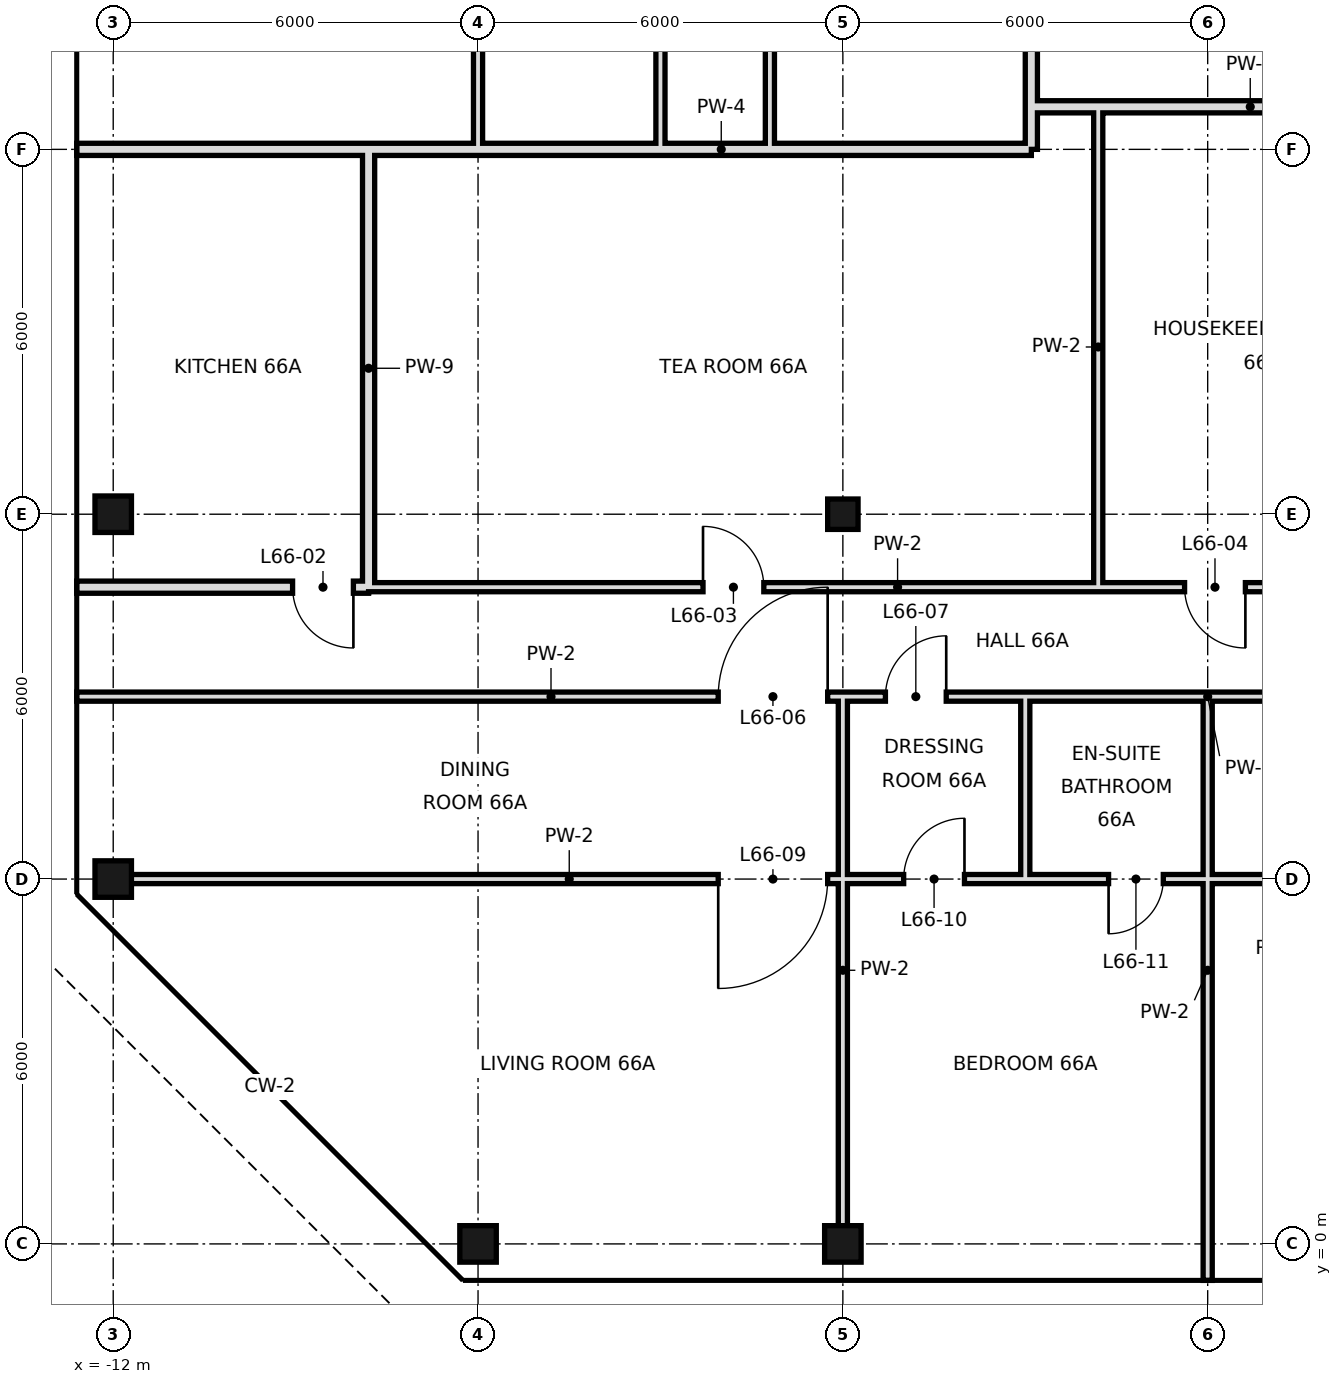
"""IFC4 building model, lengths in metres.
Left out: names, types, materials, properties, quantities, classifications, styles, units other than length and angle.
Written with IfcOpenShell. Run it as: python <this file> out.ifc"""

import sys

from ifc_helpers import new_model, si_unit, direction, frame, frame_2d, origin, origin_2d, place, context, subcontext, project, spatial, rectangle, hollow_rectangle, extrude, element, fill, save


model = new_model("IFC4")
c1 = context("Model", 3, precision=1e-05, world=origin(), true_north=direction((0.0, 1.0)))
c2 = subcontext(c1, "Body", "Model", "MODEL_VIEW")
j1 = project(units=[si_unit("LENGTHUNIT", "METRE"), si_unit("PLANEANGLEUNIT", "RADIAN")], contexts=[c1])
p1 = place(None, origin())
s1 = spatial("IfcSite", under=j1, at=p1, CompositionType="ELEMENT")
p2 = place(p1, origin())
s2 = spatial("IfcBuilding", under=s1, at=p2, CompositionType="ELEMENT")
p3 = place(p2, frame((0.0, 0.0, 277.4)))
s3 = spatial("IfcBuildingStorey", under=s2, at=p3, CompositionType="ELEMENT", Elevation=277.4)
for number, where, z_axis, x_axis in (
    (1, (-12.0, 6.0, 0.0), (0.0, 0.0, 1.0), (1.0, 0.0, 0.0)),
    (2, (-12.0, 12.0, 0.0), (0.0, 0.0, 1.0), (1.0, 0.0, 0.0)),
    (3, (-6.0, 0.0, 0.0), (0.0, 0.0, 1.0), (1.0, 0.0, 0.0)),
    (4, (0.0, 0.0, 0.0), (0.0, 0.0, 1.0), (1.0, 0.0, 0.0)),
):
    element("IfcColumn", number, at=place(p3, frame(where, z_axis=z_axis, x_axis=x_axis)), inside=s3, PredefinedType="COLUMN", context=c2, shape_type="SweptSolid", body=[
        extrude(hollow_rectangle(XDim=0.6, YDim=0.6, WallThickness=0.028, at=origin_2d()), origin(), (0.0, 0.0, 1.0), 4.4),
    ])
p4 = place(p3, frame((0.0, 12.0, 0.0), z_axis=(0.0, 0.0, 1.0), x_axis=(1.0, 0.0, 0.0)))
e5 = element("IfcColumn", 5, at=p4, inside=s3, PredefinedType="COLUMN", context=c2, shape_type="SweptSolid", body=[
    extrude(hollow_rectangle(XDim=0.5, YDim=0.5, WallThickness=0.025, at=origin_2d()), origin(), (0.0, 0.0, 1.0), 4.4),
])
p5 = place(p3, frame((-1.2, 18.0, 0.0), z_axis=(0.0, 0.0, 1.0), x_axis=(0.0, 1.0, 0.0)))
e6 = element("IfcWall", 6, at=p5, inside=s3, PredefinedType="PARTITIONING", context=c2, shape_type="SweptSolid", body=[
    extrude(rectangle(XDim=10.8, YDim=0.15, at=frame_2d((5.4, 0.0))), origin(), (0.0, 0.0, 1.0), 4.1),
])
p6 = place(p5, frame((6.76, 0.0, 0.0)))
e7 = element("IfcOpeningElement", 7, at=p6, cuts=e6, PredefinedType="OPENING", context=c2, shape_type="SweptSolid", body=[
    extrude(rectangle(XDim=1.0, YDim=2.4, at=frame_2d((0.5, 1.2))), frame((0.0, 0.085, 0.0), z_axis=(0.0, -1.0, 0.0), x_axis=(1.0, 0.0, 0.0)), (0.0, 0.0, 1.0), 0.17),
])
p7 = place(p3, frame((-3.0, 18.0, 0.0), z_axis=(0.0, 0.0, 1.0), x_axis=(0.0, 1.0, 0.0)))
e8 = element("IfcWall", 8, at=p7, inside=s3, PredefinedType="PARTITIONING", context=c2, shape_type="SweptSolid", body=[
    extrude(rectangle(XDim=15.0, YDim=0.15, at=frame_2d((7.5, 0.0))), origin(), (0.0, 0.0, 1.0), 4.1),
])
p8 = place(p7, frame((7.6, 0.0, 0.0)))
e9 = element("IfcOpeningElement", 9, at=p8, cuts=e8, PredefinedType="OPENING", context=c2, shape_type="SweptSolid", body=[
    extrude(rectangle(XDim=1.0, YDim=2.4, at=frame_2d((0.5, 1.2))), frame((0.0, 0.085, 0.0), z_axis=(0.0, -1.0, 0.0), x_axis=(1.0, 0.0, 0.0)), (0.0, 0.0, 1.0), 0.17),
])
p9 = place(p7, frame((12.7, 0.0, 0.0)))
e10 = element("IfcOpeningElement", 10, at=p9, cuts=e8, PredefinedType="OPENING", context=c2, shape_type="SweptSolid", body=[
    extrude(rectangle(XDim=1.0, YDim=2.4, at=frame_2d((0.5, 1.2))), frame((0.0, 0.085, 0.0), z_axis=(0.0, -1.0, 0.0), x_axis=(1.0, 0.0, 0.0)), (0.0, 0.0, 1.0), 0.17),
])
p10 = place(p3, frame((-6.0, 18.0, 0.0), z_axis=(0.0, 0.0, 1.0), x_axis=(0.0, 1.0, 0.0)))
e11 = element("IfcWall", 11, at=p10, inside=s3, PredefinedType="PARTITIONING", context=c2, shape_type="SweptSolid", body=[
    extrude(rectangle(XDim=15.0, YDim=0.15, at=frame_2d((7.5, 0.0))), origin(), (0.0, 0.0, 1.0), 4.1),
])
p11 = place(p10, frame((3.4, 0.0, 0.0)))
e12 = element("IfcOpeningElement", 12, at=p11, cuts=e11, PredefinedType="OPENING", context=c2, shape_type="SweptSolid", body=[
    extrude(rectangle(XDim=1.0, YDim=2.4, at=frame_2d((0.5, 1.2))), frame((0.0, 0.085, 0.0), z_axis=(0.0, -1.0, 0.0), x_axis=(1.0, 0.0, 0.0)), (0.0, 0.0, 1.0), 0.17),
])
p12 = place(p10, frame((13.0, 0.0, 0.0)))
e13 = element("IfcOpeningElement", 13, at=p12, cuts=e11, PredefinedType="OPENING", context=c2, shape_type="SweptSolid", body=[
    extrude(rectangle(XDim=1.0, YDim=2.4, at=frame_2d((0.5, 1.2))), frame((0.0, 0.085, 0.0), z_axis=(0.0, -1.0, 0.0), x_axis=(1.0, 0.0, 0.0)), (0.0, 0.0, 1.0), 0.17),
])
p13 = place(p3, frame((-7.8, 10.8, 0.0), z_axis=(0.0, 0.0, 1.0), x_axis=(0.0, 1.0, 0.0)))
e14 = element("IfcWall", 14, at=p13, inside=s3, PredefinedType="SOLIDWALL", context=c2, shape_type="SweptSolid", body=[
    extrude(rectangle(XDim=7.2, YDim=0.2, at=frame_2d((3.6, 0.0))), origin(), (0.0, 0.0, 1.0), 3.4),
])
p14 = place(p3, frame((0.0, 0.0, 0.0), z_axis=(0.0, 0.0, 1.0), x_axis=(0.0, 1.0, 0.0)))
e15 = element("IfcWall", 15, at=p14, inside=s3, PredefinedType="PARTITIONING", context=c2, shape_type="SweptSolid", body=[
    extrude(rectangle(XDim=9.0, YDim=0.15, at=frame_2d((4.5, 0.0))), origin(), (0.0, 0.0, 1.0), 3.4),
])
p15 = place(p3, frame((3.0, 6.0, 0.0), z_axis=(0.0, 0.0, 1.0), x_axis=(0.0, 1.0, 0.0)))
e16 = element("IfcWall", 16, at=p15, inside=s3, PredefinedType="PARTITIONING", context=c2, shape_type="SweptSolid", body=[
    extrude(rectangle(XDim=3.0, YDim=0.15, at=frame_2d((1.5, 0.0))), origin(), (0.0, 0.0, 1.0), 4.1),
])
p16 = place(p3, frame((3.1, 18.7, 0.0), z_axis=(0.0, 0.0, 1.0), x_axis=(0.0, 1.0, 0.0)))
e17 = element("IfcWall", 17, at=p16, inside=s3, PredefinedType="SOLIDWALL", context=c2, shape_type="SweptSolid", body=[
    extrude(rectangle(XDim=10.1, YDim=0.2, at=frame_2d((5.05, 0.0))), origin(), (0.0, 0.0, 1.0), 4.1),
])
p17 = place(p3, frame((3.1, 18.0, 0.0), z_axis=(0.0, 0.0, 1.0), x_axis=(0.0, 1.0, 0.0)))
e18 = element("IfcWall", 18, at=p17, inside=s3, PredefinedType="SOLIDWALL", context=c2, shape_type="SweptSolid", body=[
    extrude(rectangle(XDim=0.7, YDim=0.2, at=frame_2d((0.35, 0.0))), origin(), (0.0, 0.0, 1.0), 3.65),
])
p18 = place(p3, frame((4.2, 10.8, 0.0), z_axis=(0.0, 0.0, 1.0), x_axis=(0.0, 1.0, 0.0)))
e19 = element("IfcWall", 19, at=p18, inside=s3, PredefinedType="PARTITIONING", context=c2, shape_type="SweptSolid", body=[
    extrude(rectangle(XDim=7.9, YDim=0.15, at=frame_2d((3.95, 0.0))), origin(), (0.0, 0.0, 1.0), 4.1),
])
p19 = place(p3, frame((6.0, -0.6, 0.0), z_axis=(0.0, 0.0, 1.0), x_axis=(0.0, 1.0, 0.0)))
e20 = element("IfcWall", 20, at=p19, inside=s3, PredefinedType="PARTITIONING", context=c2, shape_type="SweptSolid", body=[
    extrude(rectangle(XDim=6.6, YDim=0.15, at=frame_2d((3.3, 0.0))), origin(), (0.0, 0.0, 1.0), 3.4),
])
p20 = place(p3, frame((6.0, 6.0, 0.0), z_axis=(0.0, 0.0, 1.0), x_axis=(0.0, 1.0, 0.0)))
e21 = element("IfcWall", 21, at=p20, inside=s3, PredefinedType="PARTITIONING", context=c2, shape_type="SweptSolid", body=[
    extrude(rectangle(XDim=3.0, YDim=0.15, at=frame_2d((1.5, 0.0))), origin(), (0.0, 0.0, 1.0), 3.4),
])
p21 = place(p3, frame((-12.6, 10.8, 0.0), z_axis=(0.0, 0.0, 1.0), x_axis=(1.0, 0.0, 0.0)))
e22 = element("IfcWall", 22, at=p21, inside=s3, PredefinedType="SOLIDWALL", context=c2, shape_type="SweptSolid", body=[
    extrude(rectangle(XDim=4.8, YDim=0.2, at=frame_2d((2.4, 0.0))), origin(), (0.0, 0.0, 1.0), 3.65),
])
p22 = place(p21, frame((3.55, 0.0, 0.0)))
e23 = element("IfcOpeningElement", 23, at=p22, cuts=e22, PredefinedType="OPENING", context=c2, shape_type="SweptSolid", body=[
    extrude(rectangle(XDim=1.0, YDim=2.4, at=frame_2d((0.5, 1.2))), frame((0.0, 0.11, 0.0), z_axis=(0.0, -1.0, 0.0), x_axis=(1.0, 0.0, 0.0)), (0.0, 0.0, 1.0), 0.22),
])
p23 = place(p3, frame((-7.8, 10.8, 0.0), z_axis=(0.0, 0.0, 1.0), x_axis=(1.0, 0.0, 0.0)))
e24 = element("IfcWall", 24, at=p23, inside=s3, PredefinedType="PARTITIONING", context=c2, shape_type="SweptSolid", body=[
    extrude(rectangle(XDim=17.4, YDim=0.15, at=frame_2d((8.7, 0.0))), origin(), (0.0, 0.0, 1.0), 4.1),
])
p24 = place(p23, frame((5.5, 0.0, 0.0)))
e25 = element("IfcOpeningElement", 25, at=p24, cuts=e24, PredefinedType="OPENING", context=c2, shape_type="SweptSolid", body=[
    extrude(rectangle(XDim=1.0, YDim=2.4, at=frame_2d((0.5, 1.2))), frame((0.0, 0.085, 0.0), z_axis=(0.0, -1.0, 0.0), x_axis=(1.0, 0.0, 0.0)), (0.0, 0.0, 1.0), 0.17),
])
p25 = place(p23, frame((13.42, 0.0, 0.0)))
e26 = element("IfcOpeningElement", 26, at=p25, cuts=e24, PredefinedType="OPENING", context=c2, shape_type="SweptSolid", body=[
    extrude(rectangle(XDim=1.0, YDim=2.4, at=frame_2d((0.5, 1.2))), frame((0.0, 0.085, 0.0), z_axis=(0.0, -1.0, 0.0), x_axis=(1.0, 0.0, 0.0)), (0.0, 0.0, 1.0), 0.17),
])
p26 = place(p3, frame((-12.6, 18.0, 0.0), z_axis=(0.0, 0.0, 1.0), x_axis=(1.0, 0.0, 0.0)))
e27 = element("IfcWall", 27, at=p26, inside=s3, PredefinedType="SOLIDWALL", context=c2, shape_type="SweptSolid", body=[
    extrude(rectangle(XDim=4.8, YDim=0.2, at=frame_2d((2.4, 0.0))), origin(), (0.0, 0.0, 1.0), 3.4),
])
p27 = place(p3, frame((-7.8, 18.0, 0.0), z_axis=(0.0, 0.0, 1.0), x_axis=(1.0, 0.0, 0.0)))
e28 = element("IfcWall", 28, at=p27, inside=s3, PredefinedType="SOLIDWALL", context=c2, shape_type="SweptSolid", body=[
    extrude(rectangle(XDim=10.9, YDim=0.2, at=frame_2d((5.45, 0.0))), origin(), (0.0, 0.0, 1.0), 3.4),
])
p28 = place(p3, frame((3.1, 18.7, 0.0), z_axis=(0.0, 0.0, 1.0), x_axis=(1.0, 0.0, 0.0)))
e29 = element("IfcWall", 29, at=p28, inside=s3, PredefinedType="SOLIDWALL", context=c2, shape_type="SweptSolid", body=[
    extrude(rectangle(XDim=17.3, YDim=0.2, at=frame_2d((8.65, 0.0))), origin(), (0.0, 0.0, 1.0), 3.4),
])
p29 = place(p28, frame((12.16, 0.0, 0.0)))
e30 = element("IfcOpeningElement", 30, at=p29, cuts=e29, PredefinedType="OPENING", context=c2, shape_type="SweptSolid", body=[
    extrude(rectangle(XDim=1.2, YDim=2.4, at=frame_2d((0.6, 1.2))), frame((0.0, 0.11, 0.0), z_axis=(0.0, -1.0, 0.0), x_axis=(1.0, 0.0, 0.0)), (0.0, 0.0, 1.0), 0.22),
])
p30 = place(p3, frame((-12.0, 6.0, 0.0), z_axis=(0.0, 0.0, 1.0), x_axis=(1.0, 0.0, 0.0)))
e31 = element("IfcWall", 31, at=p30, inside=s3, PredefinedType="PARTITIONING", context=c2, shape_type="SweptSolid", body=[
    extrude(rectangle(XDim=15.0, YDim=0.15, at=frame_2d((7.5, 0.0))), origin(), (0.0, 0.0, 1.0), 3.4),
])
p31 = place(p30, frame((9.95, 0.0, 0.0)))
e32 = element("IfcOpeningElement", 32, at=p31, cuts=e31, PredefinedType="OPENING", context=c2, shape_type="SweptSolid", body=[
    extrude(rectangle(XDim=1.8, YDim=2.4, at=frame_2d((0.9, 1.2))), frame((0.0, 0.085, 0.0), z_axis=(0.0, -1.0, 0.0), x_axis=(1.0, 0.0, 0.0)), (0.0, 0.0, 1.0), 0.17),
])
p32 = place(p30, frame((13.0, 0.0, 0.0)))
e33 = element("IfcOpeningElement", 33, at=p32, cuts=e31, PredefinedType="OPENING", context=c2, shape_type="SweptSolid", body=[
    extrude(rectangle(XDim=1.0, YDim=2.4, at=frame_2d((0.5, 1.2))), frame((0.0, 0.085, 0.0), z_axis=(0.0, -1.0, 0.0), x_axis=(1.0, 0.0, 0.0)), (0.0, 0.0, 1.0), 0.17),
])
p33 = place(p3, frame((6.0, 6.0, 0.0), z_axis=(0.0, 0.0, 1.0), x_axis=(1.0, 0.0, 0.0)))
e34 = element("IfcWall", 34, at=p33, inside=s3, PredefinedType="PARTITIONING", context=c2, shape_type="SweptSolid", body=[
    extrude(rectangle(XDim=3.6, YDim=0.15, at=frame_2d((1.8, 0.0))), origin(), (0.0, 0.0, 1.0), 3.65),
])
p34 = place(p33, frame((1.72, 0.0, 0.0)))
e35 = element("IfcOpeningElement", 35, at=p34, cuts=e34, PredefinedType="OPENING", context=c2, shape_type="SweptSolid", body=[
    extrude(rectangle(XDim=1.0, YDim=2.4, at=frame_2d((0.5, 1.2))), frame((0.0, 0.085, 0.0), z_axis=(0.0, -1.0, 0.0), x_axis=(1.0, 0.0, 0.0)), (0.0, 0.0, 1.0), 0.17),
])
p35 = place(p3, frame((3.0, 6.0, 0.0), z_axis=(0.0, 0.0, 1.0), x_axis=(1.0, 0.0, 0.0)))
e36 = element("IfcWall", 36, at=p35, inside=s3, PredefinedType="PARTITIONING", context=c2, shape_type="SweptSolid", body=[
    extrude(rectangle(XDim=3.0, YDim=0.15, at=frame_2d((1.5, 0.0))), origin(), (0.0, 0.0, 1.0), 3.65),
])
p36 = place(p35, frame((1.37, 0.0, 0.0)))
e37 = element("IfcOpeningElement", 37, at=p36, cuts=e36, PredefinedType="OPENING", context=c2, shape_type="SweptSolid", body=[
    extrude(rectangle(XDim=0.9, YDim=2.4, at=frame_2d((0.45, 1.2))), frame((0.0, 0.085, 0.0), z_axis=(0.0, -1.0, 0.0), x_axis=(1.0, 0.0, 0.0)), (0.0, 0.0, 1.0), 0.17),
])
p37 = place(p3, frame((-12.6, 9.0, 0.0), z_axis=(0.0, 0.0, 1.0), x_axis=(1.0, 0.0, 0.0)))
e38 = element("IfcWall", 38, at=p37, inside=s3, PredefinedType="PARTITIONING", context=c2, shape_type="SweptSolid", body=[
    extrude(rectangle(XDim=15.6, YDim=0.15, at=frame_2d((7.8, 0.0))), origin(), (0.0, 0.0, 1.0), 4.1),
])
p38 = place(p37, frame((10.55, 0.0, 0.0)))
e39 = element("IfcOpeningElement", 39, at=p38, cuts=e38, PredefinedType="OPENING", context=c2, shape_type="SweptSolid", body=[
    extrude(rectangle(XDim=1.8, YDim=2.4, at=frame_2d((0.9, 1.2))), frame((0.0, 0.085, 0.0), z_axis=(0.0, -1.0, 0.0), x_axis=(1.0, 0.0, 0.0)), (0.0, 0.0, 1.0), 0.17),
])
p39 = place(p37, frame((13.3, 0.0, 0.0)))
e40 = element("IfcOpeningElement", 40, at=p39, cuts=e38, PredefinedType="OPENING", context=c2, shape_type="SweptSolid", body=[
    extrude(rectangle(XDim=1.0, YDim=2.4, at=frame_2d((0.5, 1.2))), frame((0.0, 0.085, 0.0), z_axis=(0.0, -1.0, 0.0), x_axis=(1.0, 0.0, 0.0)), (0.0, 0.0, 1.0), 0.17),
])
p40 = place(p3, frame((6.0, 9.0, 0.0), z_axis=(0.0, 0.0, 1.0), x_axis=(1.0, 0.0, 0.0)))
e41 = element("IfcWall", 41, at=p40, inside=s3, PredefinedType="PARTITIONING", context=c2, shape_type="SweptSolid", body=[
    extrude(rectangle(XDim=3.6, YDim=0.15, at=frame_2d((1.8, 0.0))), origin(), (0.0, 0.0, 1.0), 4.1),
])
p41 = place(p40, frame((1.3, 0.0, 0.0)))
e42 = element("IfcOpeningElement", 42, at=p41, cuts=e41, PredefinedType="OPENING", context=c2, shape_type="SweptSolid", body=[
    extrude(rectangle(XDim=1.0, YDim=2.4, at=frame_2d((0.5, 1.2))), frame((0.0, 0.085, 0.0), z_axis=(0.0, -1.0, 0.0), x_axis=(1.0, 0.0, 0.0)), (0.0, 0.0, 1.0), 0.17),
])
p42 = place(p3, frame((3.0, 9.0, 0.0), z_axis=(0.0, 0.0, 1.0), x_axis=(1.0, 0.0, 0.0)))
e43 = element("IfcWall", 43, at=p42, inside=s3, PredefinedType="PARTITIONING", context=c2, shape_type="SweptSolid", body=[
    extrude(rectangle(XDim=3.0, YDim=0.15, at=frame_2d((1.5, 0.0))), origin(), (0.0, 0.0, 1.0), 4.1),
])
p43 = place(p22, origin())
e44 = element("IfcDoor", 44, at=p43, inside=s3, OperationType="SINGLE_SWING_RIGHT", PredefinedType="DOOR", context=c2, shape_type="SweptSolid", body=[
    extrude(rectangle(XDim=1.0, YDim=2.4, at=frame_2d((0.5, 1.2))), frame((0.0, 0.025, 0.0), z_axis=(0.0, -1.0, 0.0), x_axis=(1.0, 0.0, 0.0)), (0.0, 0.0, 1.0), 0.05),
])
fill(e23, e44)
p44 = place(p24, origin())
e45 = element("IfcDoor", 45, at=p44, inside=s3, OperationType="SINGLE_SWING_LEFT", PredefinedType="DOOR", context=c2, shape_type="SweptSolid", body=[
    extrude(rectangle(XDim=1.0, YDim=2.4, at=frame_2d((0.5, 1.2))), frame((0.0, 0.025, 0.0), z_axis=(0.0, -1.0, 0.0), x_axis=(1.0, 0.0, 0.0)), (0.0, 0.0, 1.0), 0.05),
])
fill(e25, e45)
p45 = place(p25, origin())
e46 = element("IfcDoor", 46, at=p45, inside=s3, OperationType="SINGLE_SWING_RIGHT", PredefinedType="DOOR", context=c2, shape_type="SweptSolid", body=[
    extrude(rectangle(XDim=1.0, YDim=2.4, at=frame_2d((0.5, 1.2))), frame((0.0, 0.025, 0.0), z_axis=(0.0, -1.0, 0.0), x_axis=(1.0, 0.0, 0.0)), (0.0, 0.0, 1.0), 0.05),
])
fill(e26, e46)
p46 = place(p38, frame((1.8, 0.0, 0.0), z_axis=(0.0, 0.0, 1.0), x_axis=(-1.0, 0.0, 0.0)))
e47 = element("IfcDoor", 47, at=p46, inside=s3, OperationType="SINGLE_SWING_LEFT", PredefinedType="DOOR", context=c2, shape_type="SweptSolid", body=[
    extrude(rectangle(XDim=1.8, YDim=2.4, at=frame_2d((0.9, 1.2))), frame((0.0, 0.025, 0.0), z_axis=(0.0, -1.0, 0.0), x_axis=(1.0, 0.0, 0.0)), (0.0, 0.0, 1.0), 0.05),
])
fill(e39, e47)
p47 = place(p39, frame((1.0, 0.0, 0.0), z_axis=(0.0, 0.0, 1.0), x_axis=(-1.0, 0.0, 0.0)))
e48 = element("IfcDoor", 48, at=p47, inside=s3, OperationType="SINGLE_SWING_LEFT", PredefinedType="DOOR", context=c2, shape_type="SweptSolid", body=[
    extrude(rectangle(XDim=1.0, YDim=2.4, at=frame_2d((0.5, 1.2))), frame((0.0, 0.025, 0.0), z_axis=(0.0, -1.0, 0.0), x_axis=(1.0, 0.0, 0.0)), (0.0, 0.0, 1.0), 0.05),
])
fill(e40, e48)
p48 = place(p31, frame((1.8, 0.0, 0.0), z_axis=(0.0, 0.0, 1.0), x_axis=(-1.0, 0.0, 0.0)))
e49 = element("IfcDoor", 49, at=p48, inside=s3, OperationType="SINGLE_SWING_RIGHT", PredefinedType="DOOR", context=c2, shape_type="SweptSolid", body=[
    extrude(rectangle(XDim=1.8, YDim=2.4, at=frame_2d((0.9, 1.2))), frame((0.0, 0.025, 0.0), z_axis=(0.0, -1.0, 0.0), x_axis=(1.0, 0.0, 0.0)), (0.0, 0.0, 1.0), 0.05),
])
fill(e32, e49)
p49 = place(p32, frame((1.0, 0.0, 0.0), z_axis=(0.0, 0.0, 1.0), x_axis=(-1.0, 0.0, 0.0)))
e50 = element("IfcDoor", 50, at=p49, inside=s3, OperationType="SINGLE_SWING_LEFT", PredefinedType="DOOR", context=c2, shape_type="SweptSolid", body=[
    extrude(rectangle(XDim=1.0, YDim=2.4, at=frame_2d((0.5, 1.2))), frame((0.0, 0.025, 0.0), z_axis=(0.0, -1.0, 0.0), x_axis=(1.0, 0.0, 0.0)), (0.0, 0.0, 1.0), 0.05),
])
fill(e33, e50)
p50 = place(p36, frame((0.9, 0.0, 0.0), z_axis=(0.0, 0.0, 1.0), x_axis=(-1.0, 0.0, 0.0)))
e51 = element("IfcDoor", 51, at=p50, inside=s3, OperationType="SINGLE_SWING_RIGHT", PredefinedType="DOOR", context=c2, shape_type="SweptSolid", body=[
    extrude(rectangle(XDim=0.9, YDim=2.4, at=frame_2d((0.45, 1.2))), frame((0.0, 0.025, 0.0), z_axis=(0.0, -1.0, 0.0), x_axis=(1.0, 0.0, 0.0)), (0.0, 0.0, 1.0), 0.05),
])
fill(e37, e51)
save(model, sys.argv[1])
